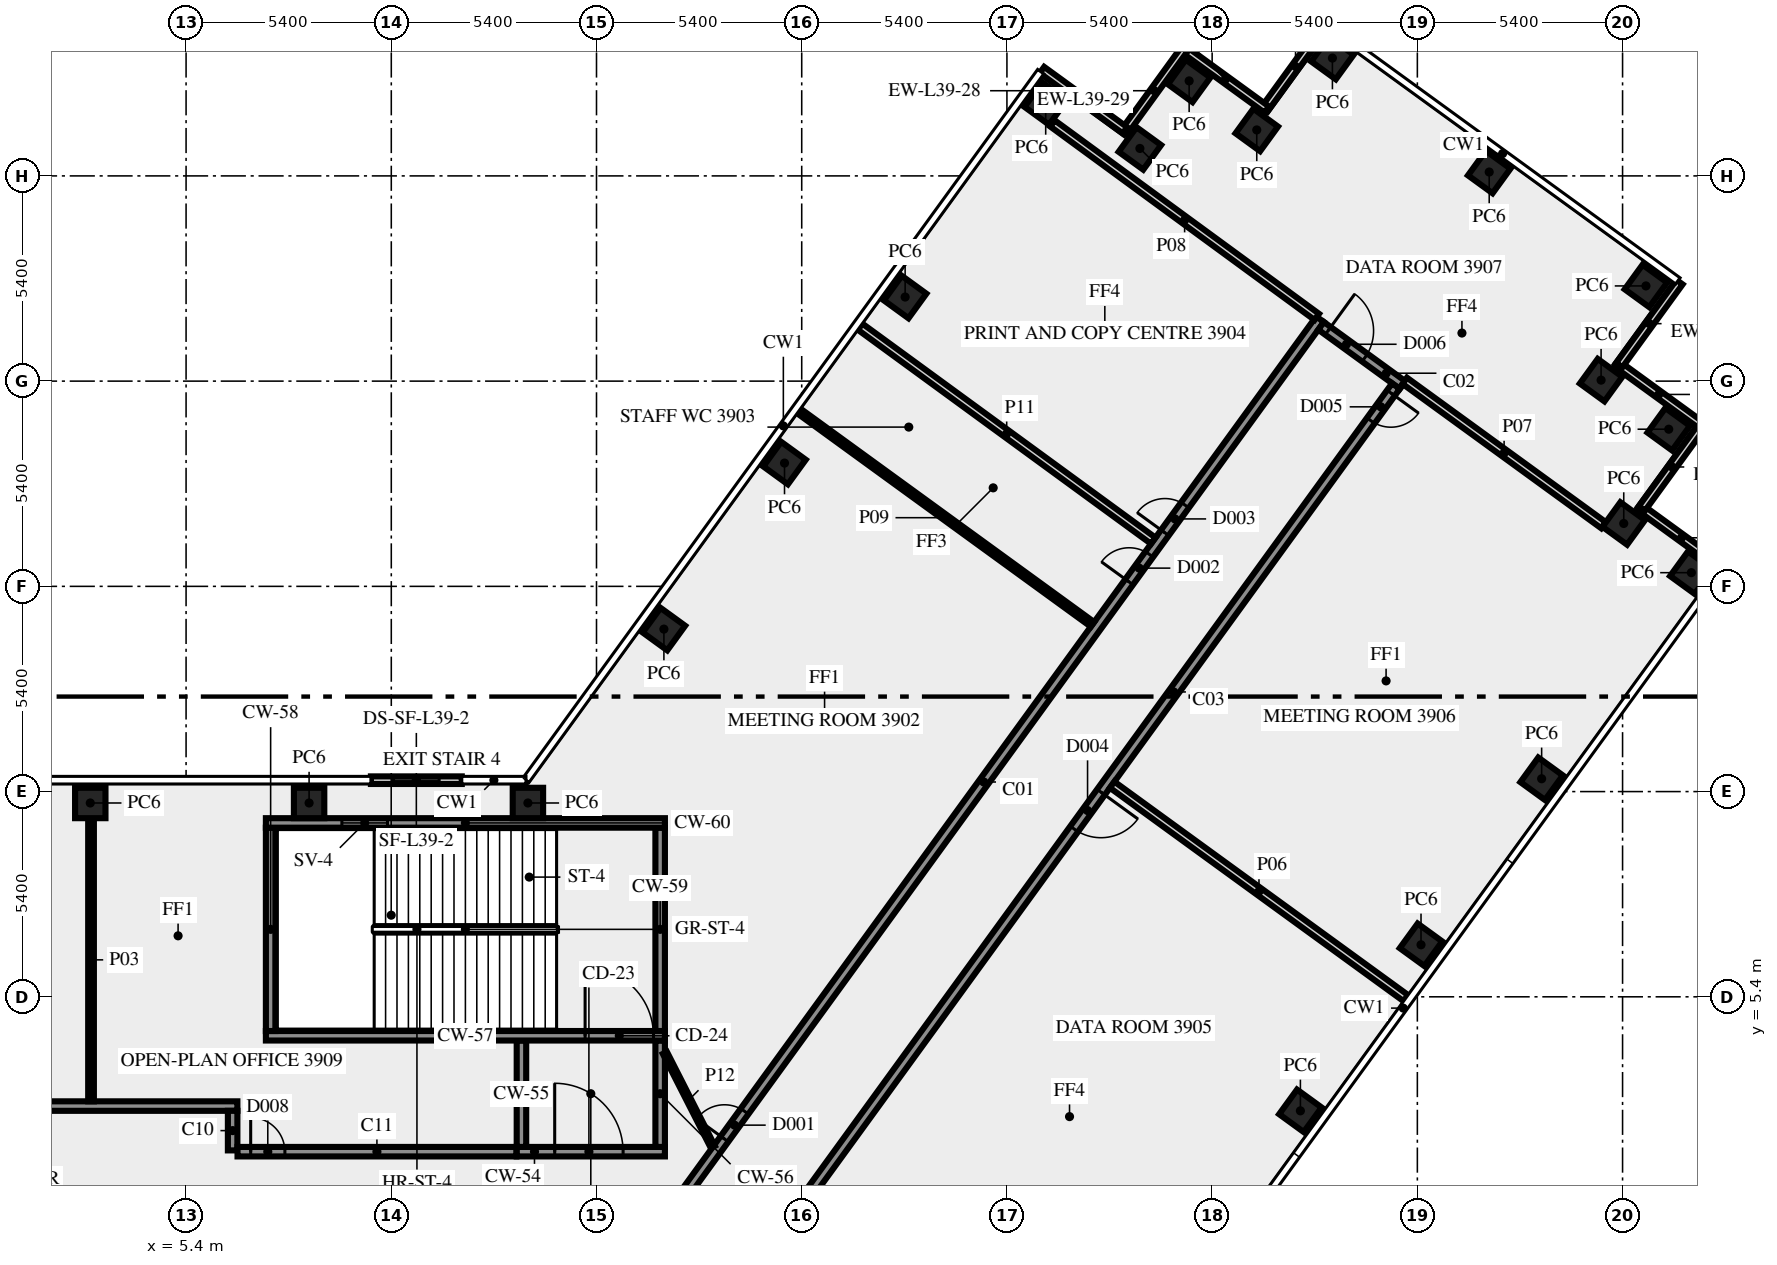
"""IFC4 building model, lengths in metres.
Left out: names, types, materials, properties, quantities, classifications, styles, units other than length and angle.
Written with IfcOpenShell. Run it as: python <this file> out.ifc"""

import sys

from ifc_helpers import new_model, si_unit, direction, frame, frame_2d, origin, origin_2d, place, context, subcontext, project, spatial, rectangle, extrude, element, fill, save


model = new_model("IFC4")
c1 = context("Model", 3, precision=1e-05, world=origin(), true_north=direction((0.0, 1.0)))
c2 = subcontext(c1, "Body", "Model", "MODEL_VIEW")
j1 = project(units=[si_unit("LENGTHUNIT", "METRE"), si_unit("PLANEANGLEUNIT", "RADIAN")], contexts=[c1])
p1 = place(None, origin())
s1 = spatial("IfcSite", under=j1, at=p1, CompositionType="ELEMENT")
p2 = place(p1, origin())
s2 = spatial("IfcBuilding", under=s1, at=p2, CompositionType="ELEMENT")
p3 = place(p2, frame((0.0, 0.0, 168.0)))
s3 = spatial("IfcBuildingStorey", under=s2, at=p3, CompositionType="ELEMENT", Elevation=168.0)
for number, where, z_axis, x_axis in (
    (1, (34.722, 2.4, 0.0), (0.0, 0.0, 1.0), (0.588, 0.809, 0.0)),
    (2, (37.896, 6.769, 0.0), (0.0, 0.0, 1.0), (0.588, 0.809, 0.0)),
    (3, (41.07, 11.137, 0.0), (0.0, 0.0, 1.0), (0.588, 0.809, 0.0)),
    (4, (45.01, 16.56, 0.0), (0.0, 0.0, 1.0), (0.588, 0.809, 0.0)),
    (5, (43.231, 17.854, 0.0), (0.0, 0.0, 1.0), (0.588, 0.809, 0.0)),
    (6, (44.415, 20.335, 0.0), (0.0, 0.0, 1.0), (0.588, 0.809, 0.0)),
    (7, (42.635, 21.626, 0.0), (0.0, 0.0, 1.0), (-0.809, 0.588, 0.0)),
    (8, (43.815, 24.105, 0.0), (0.0, 0.0, 1.0), (-0.809, 0.588, 0.0)),
    (9, (39.691, 27.102, 0.0), (0.0, 0.0, 1.0), (-0.809, 0.588, 0.0)),
    (10, (35.565, 30.1, 0.0), (0.0, 0.0, 1.0), (-0.588, -0.809, 0.0)),
    (11, (33.574, 28.209, 0.0), (0.0, 0.0, 1.0), (-0.809, 0.588, 0.0)),
    (12, (31.795, 29.5, 0.0), (0.0, 0.0, 1.0), (-0.588, -0.809, 0.0)),
    (13, (30.499, 27.723, 0.0), (0.0, 0.0, 1.0), (-0.809, 0.588, 0.0)),
    (14, (28.02, 28.905, 0.0), (0.0, 0.0, 1.0), (-0.809, 0.588, 0.0)),
    (15, (24.321, 23.812, 0.0), (0.0, 0.0, 1.0), (-0.588, -0.809, 0.0)),
    (16, (21.147, 19.444, 0.0), (0.0, 0.0, 1.0), (-0.588, -0.809, 0.0)),
    (17, (17.974, 15.075, 0.0), (0.0, 0.0, 1.0), (-0.588, -0.809, 0.0)),
    (18, (14.395, 10.5, 0.0), (0.0, 0.0, 1.0), (-1.0, 0.0, 0.0)),
    (19, (8.637, 10.5, 0.0), (0.0, 0.0, 1.0), (-1.0, 0.0, 0.0)),
    (20, (2.879, 10.5, 0.0), (0.0, 0.0, 1.0), (-1.0, 0.0, 0.0)),
):
    element("IfcColumn", number, at=place(p3, frame(where, z_axis=z_axis, x_axis=x_axis)), inside=s3, PredefinedType="COLUMN", context=c2, shape_type="SweptSolid", body=[
        extrude(rectangle(XDim=0.8, YDim=0.8, at=origin_2d()), origin(), (0.0, 0.0, 1.0), 3.65),
    ])
for number, where, z_axis, x_axis in (
    (21, (45.842, 16.685, 0.0), (0.0, 0.0, 1.0), (-0.809, 0.588, 0.0)),
    (22, (43.709, 18.249, 0.0), (0.0, 0.0, 1.0), (0.588, 0.809, 0.0)),
    (23, (45.245, 20.456, 0.0), (0.0, 0.0, 1.0), (-0.809, 0.588, 0.0)),
    (24, (43.113, 22.02, 0.0), (0.0, 0.0, 1.0), (0.588, 0.809, 0.0)),
    (25, (35.388, 30.97, 0.0), (0.0, 0.0, 1.0), (-0.588, -0.809, 0.0)),
    (26, (33.838, 28.744, 0.0), (0.0, 0.0, 1.0), (-0.809, 0.588, 0.0)),
    (27, (31.67, 30.333, 0.0), (0.0, 0.0, 1.0), (-0.588, -0.809, 0.0)),
    (28, (30.106, 28.2, 0.0), (0.0, 0.0, 1.0), (-0.809, 0.588, 0.0)),
):
    element("IfcWall", number, at=place(p3, frame(where, z_axis=z_axis, x_axis=x_axis)), inside=s3, PredefinedType="SOLIDWALL", context=c2, shape_type="SweptSolid", body=[
        extrude(rectangle(XDim=2.7, YDim=0.2, at=frame_2d((1.35, 0.0))), origin(), (0.0, 0.0, 1.0), 3.65),
    ])
p4 = place(p3, frame((12.655, 11.1, 0.0), z_axis=(0.0, 0.0, 1.0), x_axis=(-1.0, 0.0, 0.0)))
e29 = element("IfcWall", 29, at=p4, inside=s3, PredefinedType="SOLIDWALL", context=c2, shape_type="SweptSolid", body=[
    extrude(rectangle(XDim=2.392, YDim=0.2, at=frame_2d((1.196, 0.0))), origin(), (0.0, 0.0, 1.0), 3.65),
])
p5 = place(p4, frame((0.596, 0.0, 1.0)))
e30 = element("IfcOpeningElement", 30, at=p5, cuts=e29, PredefinedType="OPENING", context=c2, shape_type="SweptSolid", body=[
    extrude(rectangle(XDim=1.2, YDim=1.2, at=frame_2d((0.6, 0.6))), frame((0.0, 0.11, 0.0), z_axis=(0.0, -1.0, 0.0), x_axis=(1.0, 0.0, 0.0)), (0.0, 0.0, 1.0), 0.22),
])
p6 = place(p3, frame((14.1, 1.325, 0.0), z_axis=(0.0, 0.0, 1.0), x_axis=(1.0, 0.0, 0.0)))
e31 = element("IfcWall", 31, at=p6, inside=s3, PredefinedType="SHEAR", context=c2, shape_type="SweptSolid", body=[
    extrude(rectangle(XDim=3.9, YDim=0.25, at=frame_2d((1.95, 0.0))), origin(), (0.0, 0.0, 1.0), 3.65),
])
p7 = place(p6, frame((1.0, 0.0, 0.0)))
e32 = element("IfcOpeningElement", 32, at=p7, cuts=e31, PredefinedType="OPENING", context=c2, shape_type="SweptSolid", body=[
    extrude(rectangle(XDim=1.8, YDim=2.1, at=frame_2d((0.9, 1.05))), frame((0.0, 0.135, 0.0), z_axis=(0.0, -1.0, 0.0), x_axis=(1.0, 0.0, 0.0)), (0.0, 0.0, 1.0), 0.27),
])
for number, where, z_axis, x_axis in (
    (33, (14.225, 1.45, 0.0), (0.0, 0.0, 1.0), (0.0, 1.0, 0.0)),
    (34, (17.875, 1.45, 0.0), (0.0, 0.0, 1.0), (0.0, 1.0, 0.0)),
):
    element("IfcWall", number, at=place(p3, frame(where, z_axis=z_axis, x_axis=x_axis)), inside=s3, PredefinedType="SHEAR", context=c2, shape_type="SweptSolid", body=[
        extrude(rectangle(XDim=2.8, YDim=0.25, at=frame_2d((1.4, 0.0))), origin(), (0.0, 0.0, 1.0), 3.65),
    ])
p8 = place(p3, frame((7.5, 4.375, 0.0), z_axis=(0.0, 0.0, 1.0), x_axis=(1.0, 0.0, 0.0)))
e35 = element("IfcWall", 35, at=p8, inside=s3, PredefinedType="SHEAR", context=c2, shape_type="SweptSolid", body=[
    extrude(rectangle(XDim=10.5, YDim=0.25, at=frame_2d((5.25, 0.0))), origin(), (0.0, 0.0, 1.0), 3.65),
])
p9 = place(p8, frame((8.4, 0.0, 0.0)))
e36 = element("IfcOpeningElement", 36, at=p9, cuts=e35, PredefinedType="OPENING", context=c2, shape_type="SweptSolid", body=[
    extrude(rectangle(XDim=1.8, YDim=2.1, at=frame_2d((0.9, 1.05))), frame((0.0, 0.135, 0.0), z_axis=(0.0, -1.0, 0.0), x_axis=(1.0, 0.0, 0.0)), (0.0, 0.0, 1.0), 0.27),
])
for number, where, z_axis, x_axis in (
    (37, (7.625, 4.5, 0.0), (0.0, 0.0, 1.0), (0.0, 1.0, 0.0)),
    (38, (17.875, 4.5, 0.0), (0.0, 0.0, 1.0), (0.0, 1.0, 0.0)),
):
    element("IfcWall", number, at=place(p3, frame(where, z_axis=z_axis, x_axis=x_axis)), inside=s3, PredefinedType="SHEAR", context=c2, shape_type="SweptSolid", body=[
        extrude(rectangle(XDim=5.35, YDim=0.25, at=frame_2d((2.675, 0.0))), origin(), (0.0, 0.0, 1.0), 3.65),
    ])
p10 = place(p3, frame((7.5, 9.975, 0.0), z_axis=(0.0, 0.0, 1.0), x_axis=(1.0, 0.0, 0.0)))
e39 = element("IfcWall", 39, at=p10, inside=s3, PredefinedType="SHEAR", context=c2, shape_type="SweptSolid", body=[
    extrude(rectangle(XDim=10.5, YDim=0.25, at=frame_2d((5.25, 0.0))), origin(), (0.0, 0.0, 1.0), 3.65),
])
p11 = place(p10, frame((2.0, 0.0, 1.0)))
e40 = element("IfcOpeningElement", 40, at=p11, cuts=e39, PredefinedType="OPENING", context=c2, shape_type="SweptSolid", body=[
    extrude(rectangle(XDim=1.2, YDim=1.2, at=frame_2d((0.6, 0.6))), frame((0.0, 0.135, 0.0), z_axis=(0.0, -1.0, 0.0), x_axis=(1.0, 0.0, 0.0)), (0.0, 0.0, 1.0), 0.27),
])
p12 = place(p3, frame((17.545, -1.125, 0.0), z_axis=(0.0, 0.0, 1.0), x_axis=(0.587786330937, 0.809016210693, 0.0)))
e41 = element("IfcWall", 41, at=p12, inside=s3, PredefinedType="SOLIDWALL", context=c2, shape_type="SweptSolid", body=[
    extrude(rectangle(XDim=30.103, YDim=0.25, at=frame_2d((15.052, 0.0))), origin(), (0.0, 0.0, 1.0), 3.65),
])
p13 = place(p12, frame((3.441, 0.0, 0.0)))
e42 = element("IfcOpeningElement", 42, at=p13, cuts=e41, PredefinedType="OPENING", context=c2, shape_type="SweptSolid", body=[
    extrude(rectangle(XDim=0.9, YDim=2.1, at=frame_2d((0.45, 1.05))), frame((0.0, 0.135, 0.0), z_axis=(0.0, -1.0, 0.0), x_axis=(1.0, 0.0, 0.0)), (0.0, 0.0, 1.0), 0.27),
])
p14 = place(p12, frame((23.158, 0.0, 0.0)))
e43 = element("IfcOpeningElement", 43, at=p14, cuts=e41, PredefinedType="OPENING", context=c2, shape_type="SweptSolid", body=[
    extrude(rectangle(XDim=0.9, YDim=2.1, at=frame_2d((0.45, 1.05))), frame((0.0, 0.135, 0.0), z_axis=(0.0, -1.0, 0.0), x_axis=(1.0, 0.0, 0.0)), (0.0, 0.0, 1.0), 0.27),
])
p15 = place(p12, frame((21.558, 0.0, 0.0)))
e44 = element("IfcOpeningElement", 44, at=p15, cuts=e41, PredefinedType="OPENING", context=c2, shape_type="SweptSolid", body=[
    extrude(rectangle(XDim=0.9, YDim=2.1, at=frame_2d((0.45, 1.05))), frame((0.0, 0.135, 0.0), z_axis=(0.0, -1.0, 0.0), x_axis=(1.0, 0.0, 0.0)), (0.0, 0.0, 1.0), 0.27),
])
p16 = place(p3, frame((35.267, 23.054, 0.0), z_axis=(0.0, 0.0, 1.0), x_axis=(0.809038743598, -0.587755315891, 0.0)))
e45 = element("IfcWall", 45, at=p16, inside=s3, PredefinedType="SOLIDWALL", context=c2, shape_type="SweptSolid", body=[
    extrude(rectangle(XDim=2.65, YDim=0.25, at=frame_2d((1.325, 0.0))), origin(), (0.0, 0.0, 1.0), 3.65),
])
p17 = place(p16, frame((0.224, 0.0, 0.0)))
e46 = element("IfcOpeningElement", 46, at=p17, cuts=e45, PredefinedType="OPENING", context=c2, shape_type="SweptSolid", body=[
    extrude(rectangle(XDim=1.2, YDim=2.1, at=frame_2d((0.6, 1.05))), frame((0.0, 0.135, 0.0), z_axis=(0.0, -1.0, 0.0), x_axis=(1.0, 0.0, 0.0)), (0.0, 0.0, 1.0), 0.27),
])
p18 = place(p3, frame((37.236, 21.469, 0.0), z_axis=(0.0, 0.0, 1.0), x_axis=(-0.58778344073, -0.809018310549, 0.0)))
e47 = element("IfcWall", 47, at=p18, inside=s3, PredefinedType="SOLIDWALL", context=c2, shape_type="SweptSolid", body=[
    extrude(rectangle(XDim=28.42, YDim=0.25, at=frame_2d((14.21, 0.0))), origin(), (0.0, 0.0, 1.0), 3.65),
])
p19 = place(p18, frame((13.205, 0.0, 0.0)))
e48 = element("IfcOpeningElement", 48, at=p19, cuts=e47, PredefinedType="OPENING", context=c2, shape_type="SweptSolid", body=[
    extrude(rectangle(XDim=1.2, YDim=2.1, at=frame_2d((0.6, 1.05))), frame((0.0, 0.135, 0.0), z_axis=(0.0, -1.0, 0.0), x_axis=(1.0, 0.0, 0.0)), (0.0, 0.0, 1.0), 0.27),
])
p20 = place(p18, frame((0.224, 0.0, 0.0)))
e49 = element("IfcOpeningElement", 49, at=p20, cuts=e47, PredefinedType="OPENING", context=c2, shape_type="SweptSolid", body=[
    extrude(rectangle(XDim=0.9, YDim=2.1, at=frame_2d((0.45, 1.05))), frame((0.0, 0.135, 0.0), z_axis=(0.0, -1.0, 0.0), x_axis=(1.0, 0.0, 0.0)), (0.0, 0.0, 1.0), 0.27),
])
p21 = place(p3, frame((-4.5, 2.525, 0.0), z_axis=(0.0, 0.0, 1.0), x_axis=(1.0, 0.0, 0.0)))
e50 = element("IfcWall", 50, at=p21, inside=s3, PredefinedType="SOLIDWALL", context=c2, shape_type="SweptSolid", body=[
    extrude(rectangle(XDim=11.25, YDim=0.25, at=frame_2d((5.625, 0.0))), origin(), (0.0, 0.0, 1.0), 3.65),
])
p22 = place(p3, frame((6.625, 2.4, 0.0), z_axis=(0.0, 0.0, 1.0), x_axis=(0.0, -1.0, 0.0)))
e51 = element("IfcWall", 51, at=p22, inside=s3, PredefinedType="SOLIDWALL", context=c2, shape_type="SweptSolid", body=[
    extrude(rectangle(XDim=1.041, YDim=0.25, at=frame_2d((0.521, 0.0))), origin(), (0.0, 0.0, 1.0), 3.65),
])
p23 = place(p3, frame((6.754, 1.325, 0.0), z_axis=(0.0, 0.0, 1.0), x_axis=(1.0, 0.0, 0.0)))
e52 = element("IfcWall", 52, at=p23, inside=s3, PredefinedType="SOLIDWALL", context=c2, shape_type="SweptSolid", body=[
    extrude(rectangle(XDim=7.336, YDim=0.25, at=frame_2d((3.668, 0.0))), origin(), (0.0, 0.0, 1.0), 3.65),
])
p24 = place(p23, frame((0.346, 0.0, 0.0)))
e53 = element("IfcOpeningElement", 53, at=p24, cuts=e52, PredefinedType="OPENING", context=c2, shape_type="SweptSolid", body=[
    extrude(rectangle(XDim=0.9, YDim=2.1, at=frame_2d((0.45, 1.05))), frame((0.0, 0.135, 0.0), z_axis=(0.0, -1.0, 0.0), x_axis=(1.0, 0.0, 0.0)), (0.0, 0.0, 1.0), 0.27),
])
p25 = place(p3, frame((2.899, 10.095, 0.0), z_axis=(0.0, 0.0, 1.0), x_axis=(0.0, -1.0, 0.0)))
e54 = element("IfcWall", 54, at=p25, inside=s3, PredefinedType="PARTITIONING", context=c2, shape_type="SweptSolid", body=[
    extrude(rectangle(XDim=7.445, YDim=0.15, at=frame_2d((3.723, 0.0))), origin(), (0.0, 0.0, 1.0), 3.65),
])
p26 = place(p3, frame((37.496, 5.367, 0.0), z_axis=(0.0, 0.0, 1.0), x_axis=(-0.809048817734, 0.587741448702, 0.0)))
e55 = element("IfcWall", 55, at=p26, inside=s3, PredefinedType="SOLIDWALL", context=c2, shape_type="SweptSolid", body=[
    extrude(rectangle(XDim=9.55, YDim=0.2, at=frame_2d((4.775, 0.0))), origin(), (0.0, 0.0, 1.0), 2.85),
])
p27 = place(p3, frame((37.468, 21.61, 0.0), z_axis=(0.0, 0.0, 1.0), x_axis=(0.80901688725, -0.587785399737, 0.0)))
e56 = element("IfcWall", 56, at=p27, inside=s3, PredefinedType="SOLIDWALL", context=c2, shape_type="SweptSolid", body=[
    extrude(rectangle(XDim=6.465, YDim=0.2, at=frame_2d((3.232, 0.0))), origin(), (0.0, 0.0, 1.0), 3.65),
])
p28 = place(p3, frame((28.198, 28.381, 0.0), z_axis=(0.0, 0.0, 1.0), x_axis=(0.806977317905, -0.590582431492, 0.0)))
e57 = element("IfcWall", 57, at=p28, inside=s3, PredefinedType="SOLIDWALL", context=c2, shape_type="SweptSolid", body=[
    extrude(rectangle(XDim=8.62, YDim=0.2, at=frame_2d((4.31, 0.0))), origin(), (0.0, 0.0, 1.0), 3.65),
])
p29 = place(p3, frame((29.251, 15.2, 0.0), z_axis=(0.0, 0.0, 1.0), x_axis=(-0.808994684961, 0.587815957341, 0.0)))
e58 = element("IfcWall", 58, at=p29, inside=s3, PredefinedType="PARTITIONING", context=c2, shape_type="SweptSolid", body=[
    extrude(rectangle(XDim=9.55, YDim=0.15, at=frame_2d((4.775, 0.0))), origin(), (0.0, 0.0, 1.0), 2.85),
])
p30 = place(p3, frame((23.137, 23.032, 0.0), z_axis=(0.0, 0.0, 1.0), x_axis=(0.807661302092, -0.589646691759, 0.0)))
e59 = element("IfcWall", 59, at=p30, inside=s3, PredefinedType="SOLIDWALL", context=c2, shape_type="SweptSolid", body=[
    extrude(rectangle(XDim=9.55, YDim=0.2, at=frame_2d((4.775, 0.0))), origin(), (0.0, 0.0, 1.0), 2.85),
])
p31 = place(p3, frame((18.0, 3.925, 0.0), z_axis=(0.0, 0.0, 1.0), x_axis=(0.453950796792, -0.891026752736, 0.0)))
e60 = element("IfcWall", 60, at=p31, inside=s3, PredefinedType="PARTITIONING", context=c2, shape_type="SweptSolid", body=[
    extrude(rectangle(XDim=2.778, YDim=0.12, at=frame_2d((1.389, 0.0))), origin(), (0.0, 0.0, 1.0), 3.65),
])
p32 = place(p5, origin())
e61 = element("IfcWindow", 61, at=p32, inside=s3, PartitioningType="SINGLE_PANEL", PredefinedType="WINDOW", context=c2, shape_type="SweptSolid", body=[
    extrude(rectangle(XDim=1.2, YDim=1.2, at=frame_2d((0.6, 0.6))), frame((0.0, 0.03, 0.0), z_axis=(0.0, -1.0, 0.0), x_axis=(1.0, 0.0, 0.0)), (0.0, 0.0, 1.0), 0.06),
])
fill(e30, e61)
p33 = place(p7, origin())
e62 = element("IfcDoor", 62, at=p33, inside=s3, OperationType="DOUBLE_DOOR_SINGLE_SWING", PredefinedType="DOOR", context=c2, shape_type="SweptSolid", body=[
    extrude(rectangle(XDim=1.8, YDim=2.1, at=frame_2d((0.9, 1.05))), frame((0.0, 0.025, 0.0), z_axis=(0.0, -1.0, 0.0), x_axis=(1.0, 0.0, 0.0)), (0.0, 0.0, 1.0), 0.05),
])
fill(e32, e62)
p34 = place(p9, origin())
e63 = element("IfcDoor", 63, at=p34, inside=s3, OperationType="DOUBLE_DOOR_SINGLE_SWING", PredefinedType="DOOR", context=c2, shape_type="SweptSolid", body=[
    extrude(rectangle(XDim=1.8, YDim=2.1, at=frame_2d((0.9, 1.05))), frame((0.0, 0.025, 0.0), z_axis=(0.0, -1.0, 0.0), x_axis=(1.0, 0.0, 0.0)), (0.0, 0.0, 1.0), 0.05),
])
fill(e36, e63)
p35 = place(p11, origin())
e64 = element("IfcWindow", 64, at=p35, inside=s3, PartitioningType="SINGLE_PANEL", PredefinedType="WINDOW", context=c2, shape_type="SweptSolid", body=[
    extrude(rectangle(XDim=1.2, YDim=1.2, at=frame_2d((0.6, 0.6))), frame((0.0, 0.03, 0.0), z_axis=(0.0, -1.0, 0.0), x_axis=(1.0, 0.0, 0.0)), (0.0, 0.0, 1.0), 0.06),
])
fill(e40, e64)
p36 = place(p24, origin())
e65 = element("IfcDoor", 65, at=p36, inside=s3, OperationType="SINGLE_SWING_LEFT", PredefinedType="DOOR", context=c2, shape_type="SweptSolid", body=[
    extrude(rectangle(XDim=0.9, YDim=2.1, at=frame_2d((0.45, 1.05))), frame((0.0, 0.025, 0.0), z_axis=(0.0, -1.0, 0.0), x_axis=(1.0, 0.0, 0.0)), (0.0, 0.0, 1.0), 0.05),
])
fill(e53, e65)
p37 = place(p19, origin())
e66 = element("IfcDoor", 66, at=p37, inside=s3, OperationType="SINGLE_SWING_LEFT", PredefinedType="DOOR", context=c2, shape_type="SweptSolid", body=[
    extrude(rectangle(XDim=1.2, YDim=2.1, at=frame_2d((0.6, 1.05))), frame((0.0, 0.025, 0.0), z_axis=(0.0, -1.0, 0.0), x_axis=(1.0, 0.0, 0.0)), (0.0, 0.0, 1.0), 0.05),
])
fill(e48, e66)
p38 = place(p17, origin())
e67 = element("IfcDoor", 67, at=p38, inside=s3, OperationType="SINGLE_SWING_LEFT", PredefinedType="DOOR", context=c2, shape_type="SweptSolid", body=[
    extrude(rectangle(XDim=1.2, YDim=2.1, at=frame_2d((0.6, 1.05))), frame((0.0, 0.025, 0.0), z_axis=(0.0, -1.0, 0.0), x_axis=(1.0, 0.0, 0.0)), (0.0, 0.0, 1.0), 0.05),
])
fill(e46, e67)
p39 = place(p13, origin())
e68 = element("IfcDoor", 68, at=p39, inside=s3, OperationType="SINGLE_SWING_LEFT", PredefinedType="DOOR", context=c2, shape_type="SweptSolid", body=[
    extrude(rectangle(XDim=0.9, YDim=2.1, at=frame_2d((0.45, 1.05))), frame((0.0, 0.025, 0.0), z_axis=(0.0, -1.0, 0.0), x_axis=(1.0, 0.0, 0.0)), (0.0, 0.0, 1.0), 0.05),
])
fill(e42, e68)
p40 = place(p20, origin())
e69 = element("IfcDoor", 69, at=p40, inside=s3, OperationType="SINGLE_SWING_LEFT", PredefinedType="DOOR", context=c2, shape_type="SweptSolid", body=[
    extrude(rectangle(XDim=0.9, YDim=2.1, at=frame_2d((0.45, 1.05))), frame((0.0, 0.025, 0.0), z_axis=(0.0, -1.0, 0.0), x_axis=(1.0, 0.0, 0.0)), (0.0, 0.0, 1.0), 0.05),
])
fill(e49, e69)
p41 = place(p14, origin())
e70 = element("IfcDoor", 70, at=p41, inside=s3, OperationType="SINGLE_SWING_LEFT", PredefinedType="DOOR", context=c2, shape_type="SweptSolid", body=[
    extrude(rectangle(XDim=0.9, YDim=2.1, at=frame_2d((0.45, 1.05))), frame((0.0, 0.025, 0.0), z_axis=(0.0, -1.0, 0.0), x_axis=(1.0, 0.0, 0.0)), (0.0, 0.0, 1.0), 0.05),
])
fill(e43, e70)
p42 = place(p15, origin())
e71 = element("IfcDoor", 71, at=p42, inside=s3, OperationType="SINGLE_SWING_RIGHT", PredefinedType="DOOR", context=c2, shape_type="SweptSolid", body=[
    extrude(rectangle(XDim=0.9, YDim=2.1, at=frame_2d((0.45, 1.05))), frame((0.0, 0.025, 0.0), z_axis=(0.0, -1.0, 0.0), x_axis=(1.0, 0.0, 0.0)), (0.0, 0.0, 1.0), 0.05),
])
fill(e44, e71)
save(model, sys.argv[1])
